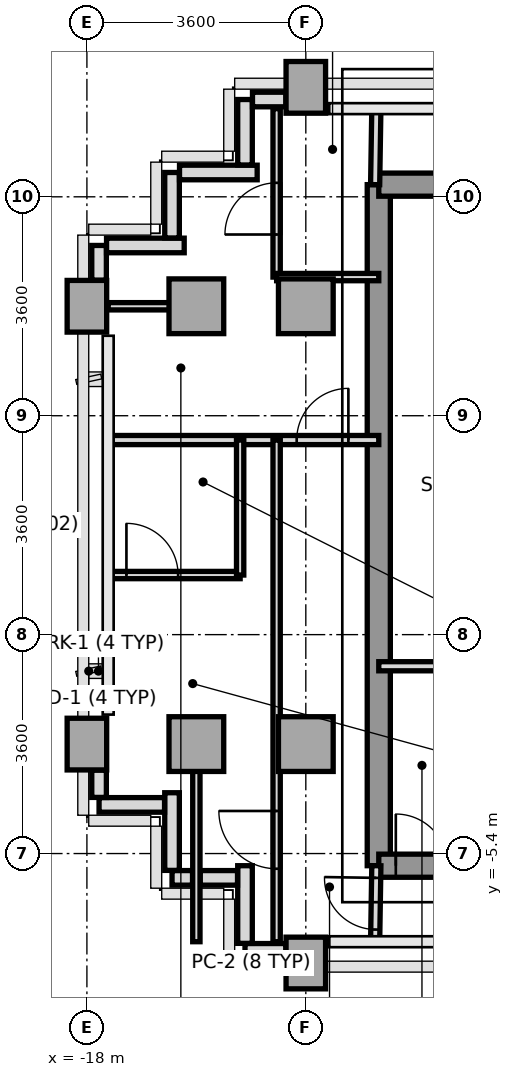
"""IFC4 building model, lengths in metres.
Left out: names, types, materials, properties, quantities, classifications, styles, units other than length and angle.
Written with IfcOpenShell. Run it as: python <this file> out.ifc"""

import sys

from ifc_helpers import new_model, si_unit, direction, frame, frame_2d, origin, origin_2d, place, context, subcontext, project, spatial, rectangle, extrude, source, transform, mapped, element, fill, save


model = new_model("IFC4")
c1 = context("Model", 3, precision=1e-05, world=origin(), true_north=direction((0.0, 1.0)))
c2 = subcontext(c1, "Body", "Model", "MODEL_VIEW")
j1 = project(units=[si_unit("LENGTHUNIT", "METRE"), si_unit("PLANEANGLEUNIT", "RADIAN")], contexts=[c1])
p1 = place(None, origin())
s1 = spatial("IfcSite", under=j1, at=p1, CompositionType="ELEMENT")
p2 = place(p1, origin())
s2 = spatial("IfcBuilding", under=s1, at=p2, CompositionType="ELEMENT")
p3 = place(p2, frame((0.0, 0.0, 184.2)))
s3 = spatial("IfcBuildingStorey", under=s2, at=p3, CompositionType="ELEMENT", Elevation=184.2)
m1 = source(origin(), c2, "Body", "SweptSolid", [
    extrude(rectangle(XDim=0.65, YDim=0.85, at=origin_2d()), origin(), (0.0, 0.0, 1.0), 3.2),
])
for number, where, z_axis, x_axis in (
    (1, (-18.0, -3.6, 0.0), (0.0, 0.0, 1.0), (1.0, 0.0, 0.0)),
    (2, (-18.0, 3.6, 0.0), (0.0, 0.0, 1.0), (1.0, 0.0, 0.0)),
):
    element("IfcColumn", number, at=place(p3, frame(where, z_axis=z_axis, x_axis=x_axis)), inside=s3, PredefinedType="COLUMN", context=c2, shape_type="MappedRepresentation", body=[
        mapped(m1, transform((0.0, 0.0, 0.0), x_axis=(1.0, 0.0, 0.0), y_axis=(0.0, 1.0, 0.0), z_axis=(0.0, 0.0, 1.0), scale=1.0)),
    ])
m2 = source(origin(), c2, "Body", "SweptSolid", [
    extrude(rectangle(XDim=0.9, YDim=0.9, at=origin_2d()), origin(), (0.0, 0.0, 1.0), 3.2),
])
for number, where, z_axis, x_axis in (
    (3, (-16.2, -3.6, 0.0), (0.0, 0.0, 1.0), (1.0, 0.0, 0.0)),
    (4, (-16.2, 3.6, 0.0), (0.0, 0.0, 1.0), (1.0, 0.0, 0.0)),
):
    element("IfcColumn", number, at=place(p3, frame(where, z_axis=z_axis, x_axis=x_axis)), inside=s3, PredefinedType="COLUMN", context=c2, shape_type="MappedRepresentation", body=[
        mapped(m2, transform((0.0, 0.0, 0.0), x_axis=(1.0, 0.0, 0.0), y_axis=(0.0, 1.0, 0.0), z_axis=(0.0, 0.0, 1.0), scale=1.0)),
    ])
p4 = place(p3, frame((-14.4, -7.2, 0.0), z_axis=(0.0, 0.0, 1.0), x_axis=(1.0, 0.0, 0.0)))
e5 = element("IfcColumn", 5, at=p4, inside=s3, PredefinedType="COLUMN", context=c2, shape_type="MappedRepresentation", body=[
    mapped(m1, transform((0.0, 0.0, 0.0), x_axis=(1.0, 0.0, 0.0), y_axis=(0.0, 1.0, 0.0), z_axis=(0.0, 0.0, 1.0), scale=1.0)),
])
for number, where, z_axis, x_axis in (
    (6, (-14.4, -3.6, 0.0), (0.0, 0.0, 1.0), (1.0, 0.0, 0.0)),
    (7, (-14.4, 3.6, 0.0), (0.0, 0.0, 1.0), (1.0, 0.0, 0.0)),
):
    element("IfcColumn", number, at=place(p3, frame(where, z_axis=z_axis, x_axis=x_axis)), inside=s3, PredefinedType="COLUMN", context=c2, shape_type="MappedRepresentation", body=[
        mapped(m2, transform((0.0, 0.0, 0.0), x_axis=(1.0, 0.0, 0.0), y_axis=(0.0, 1.0, 0.0), z_axis=(0.0, 0.0, 1.0), scale=1.0)),
    ])
p5 = place(p3, frame((-14.4, 7.2, 0.0), z_axis=(0.0, 0.0, 1.0), x_axis=(1.0, 0.0, 0.0)))
e8 = element("IfcColumn", 8, at=p5, inside=s3, PredefinedType="COLUMN", context=c2, shape_type="MappedRepresentation", body=[
    mapped(m1, transform((0.0, 0.0, 0.0), x_axis=(1.0, 0.0, 0.0), y_axis=(0.0, 1.0, 0.0), z_axis=(0.0, 0.0, 1.0), scale=1.0)),
])
p6 = place(p3, frame((-14.728, -7.0, 0.0), z_axis=(0.0, 0.0, 1.0), x_axis=(-1.0, 0.0, 0.0)))
e9 = element("IfcWall", 9, at=p6, inside=s3, PredefinedType="PARAPET", context=c2, shape_type="SweptSolid", body=[
    extrude(rectangle(XDim=0.672, YDim=0.24, at=frame_2d((0.336, 0.0))), origin(), (0.0, 0.0, 1.0), 1.15),
])
p7 = place(p3, frame((-15.4, -6.877, 0.0), z_axis=(0.0, 0.0, 1.0), x_axis=(0.0, 1.0, 0.0)))
e10 = element("IfcWall", 10, at=p7, inside=s3, PredefinedType="PARAPET", context=c2, shape_type="SweptSolid", body=[
    extrude(rectangle(XDim=1.277, YDim=0.24, at=frame_2d((0.638, 0.0))), origin(), (0.0, 0.0, 1.0), 1.15),
])
p8 = place(p3, frame((-15.523, -5.8, 0.0), z_axis=(0.0, 0.0, 1.0), x_axis=(-1.0, 0.0, 0.0)))
e11 = element("IfcWall", 11, at=p8, inside=s3, PredefinedType="PARAPET", context=c2, shape_type="SweptSolid", body=[
    extrude(rectangle(XDim=0.614, YDim=0.24, at=frame_2d((0.307, 0.0))), origin(), (0.0, 0.0, 1.0), 1.15),
])
p9 = place(p3, frame((-16.263, -5.8, 0.0), z_axis=(0.0, 0.0, 1.0), x_axis=(-1.0, 0.0, 0.0)))
e12 = element("IfcWall", 12, at=p9, inside=s3, PredefinedType="PARAPET", context=c2, shape_type="SweptSolid", body=[
    extrude(rectangle(XDim=0.337, YDim=0.24, at=frame_2d((0.168, 0.0))), origin(), (0.0, 0.0, 1.0), 1.15),
])
p10 = place(p3, frame((-16.6, -5.677, 0.0), z_axis=(0.0, 0.0, 1.0), x_axis=(0.0, 1.0, 0.0)))
e13 = element("IfcWall", 13, at=p10, inside=s3, PredefinedType="PARAPET", context=c2, shape_type="SweptSolid", body=[
    extrude(rectangle(XDim=1.277, YDim=0.24, at=frame_2d((0.639, 0.0))), origin(), (0.0, 0.0, 1.0), 1.15),
])
p11 = place(p3, frame((-16.723, -4.6, 0.0), z_axis=(0.0, 0.0, 1.0), x_axis=(-1.0, 0.0, 0.0)))
e14 = element("IfcWall", 14, at=p11, inside=s3, PredefinedType="PARAPET", context=c2, shape_type="SweptSolid", body=[
    extrude(rectangle(XDim=1.077, YDim=0.24, at=frame_2d((0.539, 0.0))), origin(), (0.0, 0.0, 1.0), 1.15),
])
p12 = place(p3, frame((-17.8, -4.477, 0.0), z_axis=(0.0, 0.0, 1.0), x_axis=(0.0, 1.0, 0.0)))
e15 = element("IfcWall", 15, at=p12, inside=s3, PredefinedType="PARAPET", context=c2, shape_type="SweptSolid", body=[
    extrude(rectangle(XDim=0.449, YDim=0.24, at=frame_2d((0.225, 0.0))), origin(), (0.0, 0.0, 1.0), 1.15),
])
p13 = place(p3, frame((-17.8, 4.028, 0.0), z_axis=(0.0, 0.0, 1.0), x_axis=(0.0, 1.0, 0.0)))
e16 = element("IfcWall", 16, at=p13, inside=s3, PredefinedType="PARAPET", context=c2, shape_type="SweptSolid", body=[
    extrude(rectangle(XDim=0.572, YDim=0.24, at=frame_2d((0.286, 0.0))), origin(), (0.0, 0.0, 1.0), 1.15),
])
p14 = place(p3, frame((-17.677, 4.6, 0.0), z_axis=(0.0, 0.0, 1.0), x_axis=(1.0, 0.0, 0.0)))
e17 = element("IfcWall", 17, at=p14, inside=s3, PredefinedType="PARAPET", context=c2, shape_type="SweptSolid", body=[
    extrude(rectangle(XDim=1.277, YDim=0.24, at=frame_2d((0.639, 0.0))), origin(), (0.0, 0.0, 1.0), 1.15),
])
p15 = place(p3, frame((-16.6, 4.723, 0.0), z_axis=(0.0, 0.0, 1.0), x_axis=(0.0, 1.0, 0.0)))
e18 = element("IfcWall", 18, at=p15, inside=s3, PredefinedType="PARAPET", context=c2, shape_type="SweptSolid", body=[
    extrude(rectangle(XDim=1.077, YDim=0.24, at=frame_2d((0.539, 0.0))), origin(), (0.0, 0.0, 1.0), 1.15),
])
p16 = place(p3, frame((-16.477, 5.8, 0.0), z_axis=(0.0, 0.0, 1.0), x_axis=(1.0, 0.0, 0.0)))
e19 = element("IfcWall", 19, at=p16, inside=s3, PredefinedType="PARAPET", context=c2, shape_type="SweptSolid", body=[
    extrude(rectangle(XDim=1.277, YDim=0.24, at=frame_2d((0.639, 0.0))), origin(), (0.0, 0.0, 1.0), 1.15),
])
p17 = place(p3, frame((-15.4, 5.923, 0.0), z_axis=(0.0, 0.0, 1.0), x_axis=(0.0, 1.0, 0.0)))
e20 = element("IfcWall", 20, at=p17, inside=s3, PredefinedType="PARAPET", context=c2, shape_type="SweptSolid", body=[
    extrude(rectangle(XDim=1.077, YDim=0.24, at=frame_2d((0.539, 0.0))), origin(), (0.0, 0.0, 1.0), 1.15),
])
p18 = place(p3, frame((-15.277, 7.0, 0.0), z_axis=(0.0, 0.0, 1.0), x_axis=(1.0, 0.0, 0.0)))
e21 = element("IfcWall", 21, at=p18, inside=s3, PredefinedType="PARAPET", context=c2, shape_type="SweptSolid", body=[
    extrude(rectangle(XDim=0.549, YDim=0.24, at=frame_2d((0.274, 0.0))), origin(), (0.0, 0.0, 1.0), 1.15),
])
p19 = place(p3, frame((-13.2, -5.6, 0.0), z_axis=(0.0, 0.0, 1.0), x_axis=(0.0, 1.0, 0.0)))
e22 = element("IfcWall", 22, at=p19, inside=s3, PredefinedType="SHEAR", context=c2, shape_type="SweptSolid", body=[
    extrude(rectangle(XDim=11.2, YDim=0.38, at=frame_2d((5.6, 0.0))), origin(), (0.0, 0.0, 1.0), 3.2),
])
p20 = place(p3, frame((-13.2, 5.6, 0.0), z_axis=(0.0, 0.0, 1.0), x_axis=(1.0, 0.0, 0.0)))
e23 = element("IfcWall", 23, at=p20, inside=s3, PredefinedType="SHEAR", context=c2, shape_type="SweptSolid", body=[
    extrude(rectangle(XDim=1.844, YDim=0.38, at=frame_2d((0.922, 0.0))), origin(), (0.0, 0.0, 1.0), 3.2),
])
p21 = place(p3, frame((-13.2, -5.6, 0.0), z_axis=(0.0, 0.0, 1.0), x_axis=(1.0, 0.0, 0.0)))
e24 = element("IfcWall", 24, at=p21, inside=s3, PredefinedType="SHEAR", context=c2, shape_type="SweptSolid", body=[
    extrude(rectangle(XDim=7.8, YDim=0.38, at=frame_2d((3.9, 0.0))), origin(), (0.0, 0.0, 1.0), 3.2),
])
p22 = place(p21, frame((0.28, 0.0, 0.0)))
e25 = element("IfcOpeningElement", 25, at=p22, cuts=e24, PredefinedType="OPENING", context=c2, shape_type="SweptSolid", body=[
    extrude(rectangle(XDim=0.85, YDim=2.1, at=frame_2d((0.425, 1.05))), frame((0.0, 0.2, 0.0), z_axis=(0.0, -1.0, 0.0), x_axis=(1.0, 0.0, 0.0)), (0.0, 0.0, 1.0), 0.4),
])
p23 = place(p21, frame((1.36, 0.0, 0.0)))
e26 = element("IfcOpeningElement", 26, at=p23, cuts=e24, PredefinedType="OPENING", context=c2, shape_type="SweptSolid", body=[
    extrude(rectangle(XDim=0.85, YDim=2.1, at=frame_2d((0.425, 1.05))), frame((0.0, 0.2, 0.0), z_axis=(0.0, -1.0, 0.0), x_axis=(1.0, 0.0, 0.0)), (0.0, 0.0, 1.0), 0.4),
])
p24 = place(p21, frame((2.85, 0.0, 0.0)))
e27 = element("IfcOpeningElement", 27, at=p24, cuts=e24, PredefinedType="OPENING", context=c2, shape_type="SweptSolid", body=[
    extrude(rectangle(XDim=0.85, YDim=2.1, at=frame_2d((0.425, 1.05))), frame((0.0, 0.2, 0.0), z_axis=(0.0, -1.0, 0.0), x_axis=(1.0, 0.0, 0.0)), (0.0, 0.0, 1.0), 0.4),
])
p25 = place(p21, frame((4.55, 0.0, 0.0)))
e28 = element("IfcOpeningElement", 28, at=p25, cuts=e24, PredefinedType="OPENING", context=c2, shape_type="SweptSolid", body=[
    extrude(rectangle(XDim=0.85, YDim=2.1, at=frame_2d((0.425, 1.05))), frame((0.0, 0.2, 0.0), z_axis=(0.0, -1.0, 0.0), x_axis=(1.0, 0.0, 0.0)), (0.0, 0.0, 1.0), 0.4),
])
p26 = place(p21, frame((6.25, 0.0, 0.0)))
e29 = element("IfcOpeningElement", 29, at=p26, cuts=e24, PredefinedType="OPENING", context=c2, shape_type="SweptSolid", body=[
    extrude(rectangle(XDim=0.85, YDim=2.1, at=frame_2d((0.425, 1.05))), frame((0.0, 0.2, 0.0), z_axis=(0.0, -1.0, 0.0), x_axis=(1.0, 0.0, 0.0)), (0.0, 0.0, 1.0), 0.4),
])
p27 = place(p3, frame((-13.2, -2.32, 0.0), z_axis=(0.0, 0.0, 1.0), x_axis=(1.0, 0.0, 0.0)))
e30 = element("IfcWall", 30, at=p27, inside=s3, PredefinedType="PARTITIONING", context=c2, shape_type="SweptSolid", body=[
    extrude(rectangle(XDim=2.18, YDim=0.15, at=frame_2d((1.09, 0.0))), origin(), (0.0, 0.0, 1.0), 3.2),
])
p28 = place(p3, frame((-13.26, -6.85, 0.0), z_axis=(0.0, 0.0, 1.0), x_axis=(0.016013571389, 0.999871774545, 0.0)))
e31 = element("IfcWall", 31, at=p28, inside=s3, PredefinedType="PARTITIONING", context=c2, shape_type="SweptSolid", body=[
    extrude(rectangle(XDim=1.25, YDim=0.15, at=frame_2d((0.625, 0.0))), origin(), (0.0, 0.0, 1.0), 3.2),
])
p29 = place(p28, frame((0.2, 0.0, 0.0)))
e32 = element("IfcOpeningElement", 32, at=p29, cuts=e31, PredefinedType="OPENING", context=c2, shape_type="SweptSolid", body=[
    extrude(rectangle(XDim=0.85, YDim=2.1, at=frame_2d((0.425, 1.05))), frame((0.0, 0.085, 0.0), z_axis=(0.0, -1.0, 0.0), x_axis=(1.0, 0.0, 0.0)), (0.0, 0.0, 1.0), 0.17),
])
p30 = place(p3, frame((-13.26, 5.6, 0.0), z_axis=(0.0, 0.0, 1.0), x_axis=(0.016013571389, 0.999871774545, 0.0)))
e33 = element("IfcWall", 33, at=p30, inside=s3, PredefinedType="PARTITIONING", context=c2, shape_type="SweptSolid", body=[
    extrude(rectangle(XDim=1.25, YDim=0.15, at=frame_2d((0.625, 0.0))), origin(), (0.0, 0.0, 1.0), 3.2),
])
p31 = place(p3, frame((-17.65, 1.4, 0.0), z_axis=(0.0, 0.0, 1.0), x_axis=(1.0, 0.0, 0.0)))
e34 = element("IfcWall", 34, at=p31, inside=s3, PredefinedType="PARTITIONING", context=c2, shape_type="SweptSolid", body=[
    extrude(rectangle(XDim=4.45, YDim=0.15, at=frame_2d((2.225, 0.0))), origin(), (0.0, 0.0, 1.0), 2.8),
])
p32 = place(p31, frame((3.1, 0.0, 0.0)))
e35 = element("IfcOpeningElement", 35, at=p32, cuts=e34, PredefinedType="OPENING", context=c2, shape_type="SweptSolid", body=[
    extrude(rectangle(XDim=0.85, YDim=2.1, at=frame_2d((0.425, 1.05))), frame((0.0, 0.085, 0.0), z_axis=(0.0, -1.0, 0.0), x_axis=(1.0, 0.0, 0.0)), (0.0, 0.0, 1.0), 0.17),
])
p33 = place(p3, frame((-16.2, -6.85, 0.0), z_axis=(0.0, 0.0, 1.0), x_axis=(0.0, 1.0, 0.0)))
e36 = element("IfcWall", 36, at=p33, inside=s3, PredefinedType="PARTITIONING", context=c2, shape_type="SweptSolid", body=[
    extrude(rectangle(XDim=3.25, YDim=0.12, at=frame_2d((1.625, 0.0))), origin(), (0.0, 0.0, 1.0), 3.2),
])
p34 = place(p3, frame((-17.65, 3.6, 0.0), z_axis=(0.0, 0.0, 1.0), x_axis=(1.0, 0.0, 0.0)))
e37 = element("IfcWall", 37, at=p34, inside=s3, PredefinedType="PARTITIONING", context=c2, shape_type="SweptSolid", body=[
    extrude(rectangle(XDim=1.45, YDim=0.12, at=frame_2d((0.725, 0.0))), origin(), (0.0, 0.0, 1.0), 3.2),
])
p35 = place(p3, frame((-14.88, -6.85, 0.0), z_axis=(0.0, 0.0, 1.0), x_axis=(0.0, 1.0, 0.0)))
e38 = element("IfcWall", 38, at=p35, inside=s3, PredefinedType="PARTITIONING", context=c2, shape_type="SweptSolid", body=[
    extrude(rectangle(XDim=8.25, YDim=0.12, at=frame_2d((4.125, 0.0))), origin(), (0.0, 0.0, 1.0), 3.2),
])
p36 = place(p35, frame((1.2, 0.0, 0.0)))
e39 = element("IfcOpeningElement", 39, at=p36, cuts=e38, PredefinedType="OPENING", context=c2, shape_type="SweptSolid", body=[
    extrude(rectangle(XDim=0.95, YDim=2.15, at=frame_2d((0.475, 1.075))), frame((0.0, 0.07, 0.0), z_axis=(0.0, -1.0, 0.0), x_axis=(1.0, 0.0, 0.0)), (0.0, 0.0, 1.0), 0.14),
])
p37 = place(p3, frame((-17.65, -0.82, 0.0), z_axis=(0.0, 0.0, 1.0), x_axis=(1.0, 0.0, 0.0)))
e40 = element("IfcWall", 40, at=p37, inside=s3, PredefinedType="PARTITIONING", context=c2, shape_type="SweptSolid", body=[
    extrude(rectangle(XDim=2.17, YDim=0.12, at=frame_2d((1.085, 0.0))), origin(), (0.0, 0.0, 1.0), 2.8),
])
p38 = place(p37, frame((0.3, 0.0, 0.0)))
e41 = element("IfcOpeningElement", 41, at=p38, cuts=e40, PredefinedType="OPENING", context=c2, shape_type="SweptSolid", body=[
    extrude(rectangle(XDim=0.85, YDim=2.1, at=frame_2d((0.425, 1.05))), frame((0.0, 0.07, 0.0), z_axis=(0.0, -1.0, 0.0), x_axis=(1.0, 0.0, 0.0)), (0.0, 0.0, 1.0), 0.14),
])
p39 = place(p3, frame((-15.48, -0.82, 0.0), z_axis=(0.0, 0.0, 1.0), x_axis=(0.0, 1.0, 0.0)))
e42 = element("IfcWall", 42, at=p39, inside=s3, PredefinedType="PARTITIONING", context=c2, shape_type="SweptSolid", body=[
    extrude(rectangle(XDim=2.22, YDim=0.12, at=frame_2d((1.11, 0.0))), origin(), (0.0, 0.0, 1.0), 3.2),
])
p40 = place(p3, frame((-14.88, 4.08, 0.0), z_axis=(0.0, 0.0, 1.0), x_axis=(0.0, 1.0, 0.0)))
e43 = element("IfcWall", 43, at=p40, inside=s3, PredefinedType="PARTITIONING", context=c2, shape_type="SweptSolid", body=[
    extrude(rectangle(XDim=2.77, YDim=0.12, at=frame_2d((1.385, 0.0))), origin(), (0.0, 0.0, 1.0), 3.2),
])
p41 = place(p40, frame((0.7, 0.0, 0.0)))
e44 = element("IfcOpeningElement", 44, at=p41, cuts=e43, PredefinedType="OPENING", context=c2, shape_type="SweptSolid", body=[
    extrude(rectangle(XDim=0.85, YDim=2.1, at=frame_2d((0.425, 1.05))), frame((0.0, 0.07, 0.0), z_axis=(0.0, -1.0, 0.0), x_axis=(1.0, 0.0, 0.0)), (0.0, 0.0, 1.0), 0.14),
])
p42 = place(p3, frame((-14.88, 4.08, 0.0), z_axis=(0.0, 0.0, 1.0), x_axis=(1.0, 0.0, 0.0)))
e45 = element("IfcWall", 45, at=p42, inside=s3, PredefinedType="PARTITIONING", context=c2, shape_type="SweptSolid", body=[
    extrude(rectangle(XDim=1.68, YDim=0.12, at=frame_2d((0.84, 0.0))), origin(), (0.0, 0.0, 1.0), 2.8),
])
m3 = source(origin(), c2, "Body", "SweptSolid", [
    extrude(rectangle(XDim=0.85, YDim=2.1, at=frame_2d((0.425, 1.05))), frame((0.0, 0.025, 0.0), z_axis=(0.0, -1.0, 0.0), x_axis=(1.0, 0.0, 0.0)), (0.0, 0.0, 1.0), 0.05),
])
p43 = place(p22, origin())
e46 = element("IfcDoor", 46, at=p43, inside=s3, OperationType="SINGLE_SWING_LEFT", PredefinedType="DOOR", context=c2, shape_type="MappedRepresentation", body=[
    mapped(m3, transform((0.0, 0.0, 0.0), x_axis=(1.0, 0.0, 0.0), y_axis=(0.0, 1.0, 0.0), z_axis=(0.0, 0.0, 1.0), scale=1.0)),
])
fill(e25, e46)
p44 = place(p29, origin())
e47 = element("IfcDoor", 47, at=p44, inside=s3, OperationType="SINGLE_SWING_RIGHT", PredefinedType="DOOR", context=c2, shape_type="MappedRepresentation", body=[
    mapped(m3, transform((0.0, 0.0, 0.0), x_axis=(1.0, 0.0, 0.0), y_axis=(0.0, 1.0, 0.0), z_axis=(0.0, 0.0, 1.0), scale=1.0)),
])
fill(e32, e47)
p45 = place(p38, origin())
e48 = element("IfcDoor", 48, at=p45, inside=s3, OperationType="SINGLE_SWING_LEFT", PredefinedType="DOOR", context=c2, shape_type="MappedRepresentation", body=[
    mapped(m3, transform((0.0, 0.0, 0.0), x_axis=(1.0, 0.0, 0.0), y_axis=(0.0, 1.0, 0.0), z_axis=(0.0, 0.0, 1.0), scale=1.0)),
])
fill(e41, e48)
m4 = source(origin(), c2, "Body", "SweptSolid", [
    extrude(rectangle(XDim=0.95, YDim=2.15, at=frame_2d((0.475, 1.075))), frame((0.0, 0.025, 0.0), z_axis=(0.0, -1.0, 0.0), x_axis=(1.0, 0.0, 0.0)), (0.0, 0.0, 1.0), 0.05),
])
p46 = place(p36, origin())
e49 = element("IfcDoor", 49, at=p46, inside=s3, OperationType="SINGLE_SWING_RIGHT", PredefinedType="DOOR", context=c2, shape_type="MappedRepresentation", body=[
    mapped(m4, transform((0.0, 0.0, 0.0), x_axis=(1.0, 0.0, 0.0), y_axis=(0.0, 1.0, 0.0), z_axis=(0.0, 0.0, 1.0), scale=1.0)),
])
fill(e39, e49)
p47 = place(p41, origin())
e50 = element("IfcDoor", 50, at=p47, inside=s3, OperationType="SINGLE_SWING_LEFT", PredefinedType="DOOR", context=c2, shape_type="MappedRepresentation", body=[
    mapped(m3, transform((0.0, 0.0, 0.0), x_axis=(1.0, 0.0, 0.0), y_axis=(0.0, 1.0, 0.0), z_axis=(0.0, 0.0, 1.0), scale=1.0)),
])
fill(e44, e50)
p48 = place(p32, origin())
e51 = element("IfcDoor", 51, at=p48, inside=s3, OperationType="SINGLE_SWING_RIGHT", PredefinedType="DOOR", context=c2, shape_type="MappedRepresentation", body=[
    mapped(m3, transform((0.0, 0.0, 0.0), x_axis=(1.0, 0.0, 0.0), y_axis=(0.0, 1.0, 0.0), z_axis=(0.0, 0.0, 1.0), scale=1.0)),
])
fill(e35, e51)
save(model, sys.argv[1])
